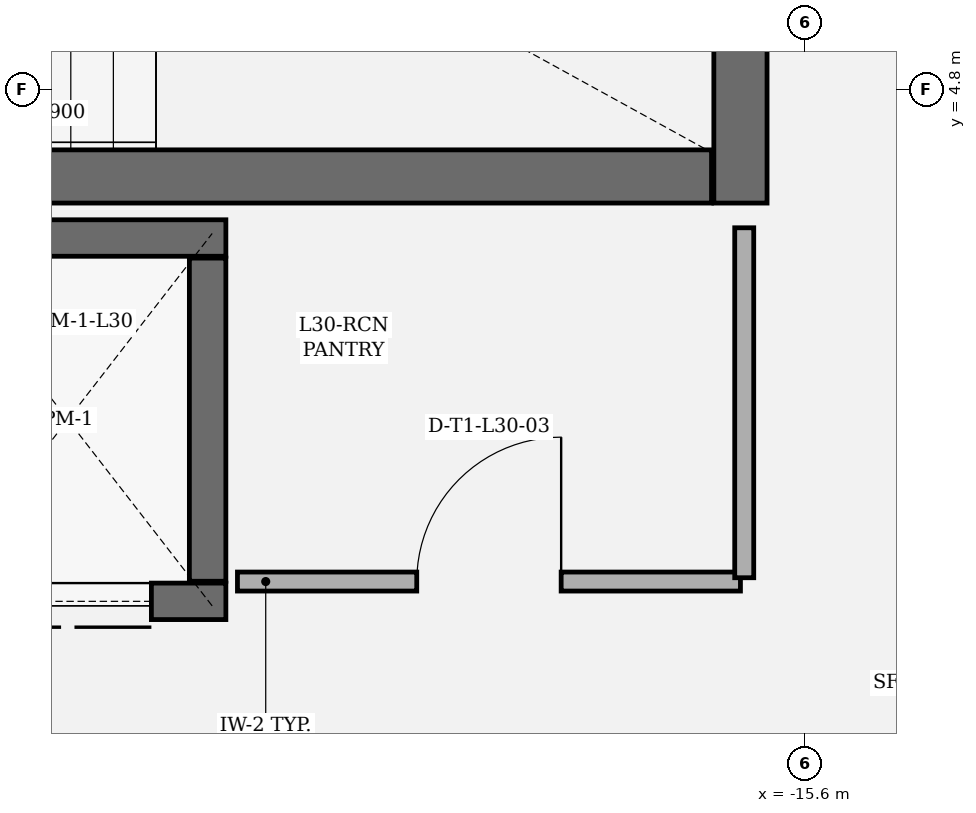
"""IFC4 building model, lengths in metres.
Left out: names, types, materials, properties, quantities, classifications, styles, units other than length and angle.
Written with IfcOpenShell. Run it as: python <this file> out.ifc"""

import sys

from ifc_helpers import new_model, si_unit, direction, frame, frame_2d, origin, place, context, subcontext, project, spatial, rectangle, extrude, element, fill, save


model = new_model("IFC4")
c1 = context("Model", 3, precision=1e-05, world=origin(), true_north=direction((0.0, 1.0)))
c2 = subcontext(c1, "Body", "Model", "MODEL_VIEW")
j1 = project(units=[si_unit("LENGTHUNIT", "METRE"), si_unit("PLANEANGLEUNIT", "RADIAN")], contexts=[c1])
p1 = place(None, origin())
s1 = spatial("IfcSite", under=j1, at=p1, CompositionType="ELEMENT")
p2 = place(p1, origin())
s2 = spatial("IfcBuilding", under=s1, at=p2, CompositionType="ELEMENT")
p3 = place(p2, frame((0.0, 0.0, 134.1)))
s3 = spatial("IfcBuildingStorey", under=s2, at=p3, CompositionType="ELEMENT", Elevation=134.1)
p4 = place(p3, frame((-16.025, 4.05, 0.0), z_axis=(0.0, 0.0, 1.0), x_axis=(0.0, 1.0, 0.0)))
e1 = element("IfcWall", 1, at=p4, inside=s3, PredefinedType="SHEAR", context=c2, shape_type="SweptSolid", body=[
    extrude(rectangle(XDim=4.21, YDim=0.35, at=frame_2d((2.105, 0.0))), origin(), (0.0, 0.0, 1.0), 3.78),
])
p5 = place(p3, frame((-24.335, 4.225, 0.0), z_axis=(0.0, 0.0, 1.0), x_axis=(1.0, 0.0, 0.0)))
e2 = element("IfcWall", 2, at=p5, inside=s3, PredefinedType="SHEAR", context=c2, shape_type="SweptSolid", body=[
    extrude(rectangle(XDim=8.12, YDim=0.35, at=frame_2d((4.06, 0.0))), origin(), (0.0, 0.0, 1.0), 3.78),
])
p6 = place(p3, frame((-19.41, 1.43, 0.0), z_axis=(0.0, 0.0, 1.0), x_axis=(-1.0, 0.0, 0.0)))
e3 = element("IfcWall", 3, at=p6, inside=s3, PredefinedType="SHEAR", context=c2, shape_type="SweptSolid", body=[
    extrude(rectangle(XDim=2.08, YDim=0.24, at=frame_2d((1.04, 0.0))), origin(), (0.0, 0.0, 1.0), 3.78),
])
p7 = place(p6, frame((0.49, 0.0, 0.0)))
e4 = element("IfcOpeningElement", 4, at=p7, cuts=e3, PredefinedType="OPENING", context=c2, shape_type="SweptSolid", body=[
    extrude(rectangle(XDim=1.1, YDim=2.2, at=frame_2d((0.55, 1.1))), frame((0.0, 0.13, 0.0), z_axis=(0.0, -1.0, 0.0), x_axis=(1.0, 0.0, 0.0)), (0.0, 0.0, 1.0), 0.26),
])
p8 = place(p3, frame((-21.49, 3.82, 0.0), z_axis=(0.0, 0.0, 1.0), x_axis=(1.0, 0.0, 0.0)))
e5 = element("IfcWall", 5, at=p8, inside=s3, PredefinedType="SHEAR", context=c2, shape_type="SweptSolid", body=[
    extrude(rectangle(XDim=2.08, YDim=0.24, at=frame_2d((1.04, 0.0))), origin(), (0.0, 0.0, 1.0), 3.78),
])
p9 = place(p3, frame((-19.53, 3.688, 0.0), z_axis=(0.0, 0.0, 1.0), x_axis=(0.0, -1.0, 0.0)))
e6 = element("IfcWall", 6, at=p9, inside=s3, PredefinedType="SHEAR", context=c2, shape_type="SweptSolid", body=[
    extrude(rectangle(XDim=2.126, YDim=0.24, at=frame_2d((1.063, 0.0))), origin(), (0.0, 0.0, 1.0), 3.78),
])
p10 = place(p3, frame((-19.334, 1.56, 0.0), z_axis=(0.0, 0.0, 1.0), x_axis=(1.0, 0.0, 0.0)))
e7 = element("IfcWall", 7, at=p10, inside=s3, PredefinedType="PARTITIONING", context=c2, shape_type="SweptSolid", body=[
    extrude(rectangle(XDim=3.309, YDim=0.125, at=frame_2d((1.654, 0.0))), origin(), (0.0, 0.0, 1.0), 3.78),
])
p11 = place(p10, frame((1.179, 0.0, 0.0)))
e8 = element("IfcOpeningElement", 8, at=p11, cuts=e7, PredefinedType="OPENING", context=c2, shape_type="SweptSolid", body=[
    extrude(rectangle(XDim=0.95, YDim=2.15, at=frame_2d((0.475, 1.075))), frame((0.0, 0.073, 0.0), z_axis=(0.0, -1.0, 0.0), x_axis=(1.0, 0.0, 0.0)), (0.0, 0.0, 1.0), 0.145),
])
p12 = place(p3, frame((-16.0, 1.585, 0.0), z_axis=(0.0, 0.0, 1.0), x_axis=(0.0, 1.0, 0.0)))
e9 = element("IfcWall", 9, at=p12, inside=s3, PredefinedType="PARTITIONING", context=c2, shape_type="SweptSolid", body=[
    extrude(rectangle(XDim=2.302, YDim=0.125, at=frame_2d((1.151, 0.0))), origin(), (0.0, 0.0, 1.0), 3.78),
])
p13 = place(p7, origin())
e10 = element("IfcDoor", 10, at=p13, inside=s3, OperationType="DOUBLE_DOOR_SLIDING", PredefinedType="DOOR", context=c2, shape_type="SweptSolid", body=[
    extrude(rectangle(XDim=1.1, YDim=2.2, at=frame_2d((0.55, 1.1))), frame((0.0, 0.025, 0.0), z_axis=(0.0, -1.0, 0.0), x_axis=(1.0, 0.0, 0.0)), (0.0, 0.0, 1.0), 0.05),
])
fill(e4, e10)
p14 = place(p11, origin())
e11 = element("IfcDoor", 11, at=p14, inside=s3, OperationType="SINGLE_SWING_RIGHT", PredefinedType="DOOR", context=c2, shape_type="SweptSolid", body=[
    extrude(rectangle(XDim=0.95, YDim=2.15, at=frame_2d((0.475, 1.075))), frame((0.0, 0.025, 0.0), z_axis=(0.0, -1.0, 0.0), x_axis=(1.0, 0.0, 0.0)), (0.0, 0.0, 1.0), 0.05),
])
fill(e8, e11)
save(model, sys.argv[1])
